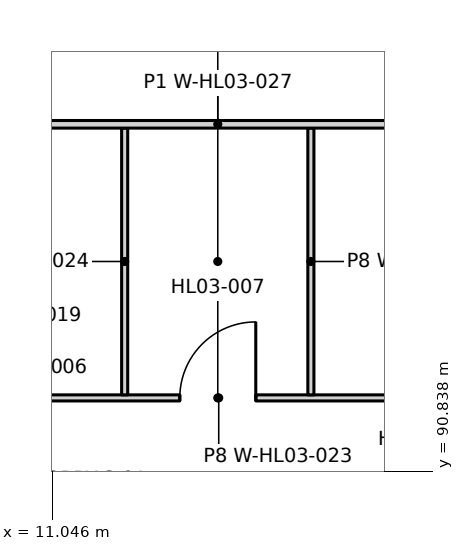
"""IFC4 building model, lengths in metres.
Left out: names, types, materials, properties, quantities, classifications, styles, units other than length and angle.
Written with IfcOpenShell. Run it as: python <this file> out.ifc"""

import sys

from ifc_helpers import new_model, si_unit, direction, frame, frame_2d, origin, place, context, subcontext, project, spatial, rectangle, extrude, element, fill, save


model = new_model("IFC4")
c1 = context("Model", 3, precision=1e-05, world=origin(), true_north=direction((0.0, 1.0)))
c2 = subcontext(c1, "Body", "Model", "MODEL_VIEW")
j1 = project(units=[si_unit("LENGTHUNIT", "METRE"), si_unit("PLANEANGLEUNIT", "RADIAN")], contexts=[c1])
p1 = place(None, origin())
s1 = spatial("IfcSite", under=j1, at=p1, CompositionType="ELEMENT")
p2 = place(p1, origin())
s2 = spatial("IfcBuilding", under=s1, at=p2, CompositionType="ELEMENT")
p3 = place(p2, frame((0.0, 0.0, 15.0)))
s3 = spatial("IfcBuildingStorey", under=s2, at=p3, CompositionType="ELEMENT", Elevation=15.0)
p4 = place(p3, frame((9.05, 91.8, 0.0), z_axis=(0.0, 0.0, 1.0), x_axis=(1.0, 0.0, 0.0)))
e1 = element("IfcWall", 1, at=p4, inside=s3, PredefinedType="PARTITIONING", context=c2, shape_type="SweptSolid", body=[
    extrude(rectangle(XDim=8.375, YDim=0.08, at=frame_2d((4.188, 0.0))), origin(), (0.0, 0.0, 1.0), 4.2),
])
p5 = place(p4, frame((0.95, 0.0, 0.0)))
e2 = element("IfcOpeningElement", 2, at=p5, cuts=e1, PredefinedType="OPENING", context=c2, shape_type="SweptSolid", body=[
    extrude(rectangle(XDim=1.0, YDim=2.1, at=frame_2d((0.5, 1.05))), frame((0.0, 0.05, 0.0), z_axis=(0.0, -1.0, 0.0), x_axis=(1.0, 0.0, 0.0)), (0.0, 0.0, 1.0), 0.1),
])
p6 = place(p4, frame((3.675, 0.0, 0.0)))
e3 = element("IfcOpeningElement", 3, at=p6, cuts=e1, PredefinedType="OPENING", context=c2, shape_type="SweptSolid", body=[
    extrude(rectangle(XDim=1.0, YDim=2.1, at=frame_2d((0.5, 1.05))), frame((0.0, 0.05, 0.0), z_axis=(0.0, -1.0, 0.0), x_axis=(1.0, 0.0, 0.0)), (0.0, 0.0, 1.0), 0.1),
])
p7 = place(p4, frame((6.4, 0.0, 0.0)))
e4 = element("IfcOpeningElement", 4, at=p7, cuts=e1, PredefinedType="OPENING", context=c2, shape_type="SweptSolid", body=[
    extrude(rectangle(XDim=1.0, YDim=2.1, at=frame_2d((0.5, 1.05))), frame((0.0, 0.05, 0.0), z_axis=(0.0, -1.0, 0.0), x_axis=(1.0, 0.0, 0.0)), (0.0, 0.0, 1.0), 0.1),
])
for number, where, z_axis, x_axis in (
    (5, (12.0, 91.84, 0.0), (0.0, 0.0, 1.0), (0.0, 1.0, 0.0)),
    (6, (14.45, 91.84, 0.0), (0.0, 0.0, 1.0), (0.0, 1.0, 0.0)),
):
    element("IfcWall", number, at=place(p3, frame(where, z_axis=z_axis, x_axis=x_axis)), inside=s3, PredefinedType="PARTITIONING", context=c2, shape_type="SweptSolid", body=[
        extrude(rectangle(XDim=3.51, YDim=0.08, at=frame_2d((1.755, 0.0))), origin(), (0.0, 0.0, 1.0), 4.2),
    ])
p8 = place(p3, frame((8.95, 95.4, 0.0), z_axis=(0.0, 0.0, 1.0), x_axis=(1.0, 0.0, 0.0)))
e7 = element("IfcWall", 7, at=p8, inside=s3, PredefinedType="PARTITIONING", context=c2, shape_type="SweptSolid", body=[
    extrude(rectangle(XDim=8.55, YDim=0.1, at=frame_2d((4.275, 0.0))), origin(), (0.0, 0.0, 1.0), 4.2),
])
p9 = place(p6, origin())
e8 = element("IfcDoor", 8, at=p9, inside=s3, OperationType="SINGLE_SWING_RIGHT", PredefinedType="DOOR", context=c2, shape_type="SweptSolid", body=[
    extrude(rectangle(XDim=1.0, YDim=2.1, at=frame_2d((0.5, 1.05))), frame((0.0, 0.025, 0.0), z_axis=(0.0, -1.0, 0.0), x_axis=(1.0, 0.0, 0.0)), (0.0, 0.0, 1.0), 0.05),
])
fill(e3, e8)
save(model, sys.argv[1])
